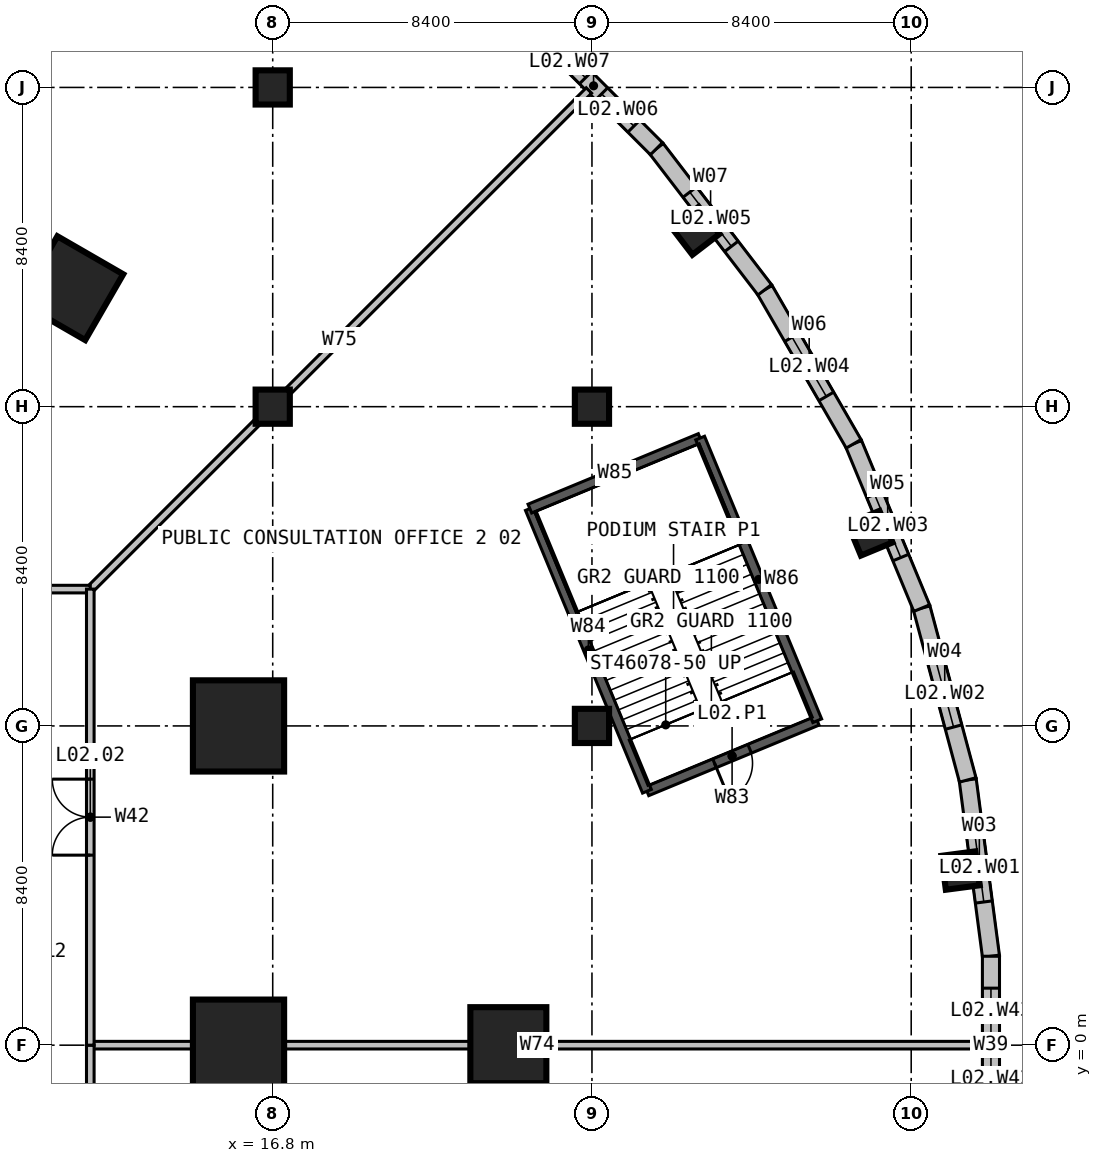
"""IFC4 building model, lengths in metres.
Left out: names, types, materials, properties, quantities, classifications, styles, units other than length and angle.
Written with IfcOpenShell. Run it as: python <this file> out.ifc"""

import sys

from ifc_helpers import new_model, si_unit, direction, frame, frame_2d, origin, origin_2d, place, context, subcontext, project, spatial, rectangle, hollow_rectangle, extrude, element, fill, save


model = new_model("IFC4")
c1 = context("Model", 3, precision=1e-05, world=origin(), true_north=direction((0.0, 1.0)))
c2 = subcontext(c1, "Body", "Model", "MODEL_VIEW")
j1 = project(units=[si_unit("LENGTHUNIT", "METRE"), si_unit("PLANEANGLEUNIT", "RADIAN")], contexts=[c1])
p1 = place(None, origin())
s1 = spatial("IfcSite", under=j1, at=p1, CompositionType="ELEMENT")
p2 = place(p1, origin())
s2 = spatial("IfcBuilding", under=s1, at=p2, CompositionType="ELEMENT")
p3 = place(p2, frame((0.0, 0.0, 11.0)))
s3 = spatial("IfcBuildingStorey", under=s2, at=p3, CompositionType="ELEMENT", Elevation=11.0)
for number, where, z_axis, x_axis in (
    (1, (15.9, 0.0, 0.0), (0.0, 0.0, 1.0), (1.0, 0.0, 0.0)),
    (2, (15.9, 8.4, 0.0), (0.0, 0.0, 1.0), (1.0, 0.0, 0.0)),
):
    element("IfcColumn", number, at=place(p3, frame(where, z_axis=z_axis, x_axis=x_axis)), inside=s3, PredefinedType="COLUMN", context=c2, shape_type="SweptSolid", body=[
        extrude(rectangle(XDim=2.4, YDim=2.4, at=origin_2d()), origin(), (0.0, 0.0, 1.0), 5.0),
    ])
for number, where, z_axis, x_axis in (
    (3, (16.8, 16.8, 0.0), (0.0, 0.0, 1.0), (1.0, 0.0, 0.0)),
    (4, (16.8, 25.2, 0.0), (0.0, 0.0, 1.0), (1.0, 0.0, 0.0)),
    (5, (25.2, 8.4, 0.0), (0.0, 0.0, 1.0), (1.0, 0.0, 0.0)),
    (6, (25.2, 16.8, 0.0), (0.0, 0.0, 1.0), (1.0, 0.0, 0.0)),
    (7, (34.899, 4.594, 0.0), (0.0, 0.0, 1.0), (0.991, 0.131, 0.0)),
    (8, (32.521, 13.47, 0.0), (0.0, 0.0, 1.0), (0.924, 0.383, 0.0)),
    (9, (27.926, 21.428, 0.0), (0.0, 0.0, 1.0), (0.793, 0.609, 0.0)),
):
    element("IfcColumn", number, at=place(p3, frame(where, z_axis=z_axis, x_axis=x_axis)), inside=s3, PredefinedType="COLUMN", context=c2, shape_type="SweptSolid", body=[
        extrude(rectangle(XDim=0.9, YDim=0.9, at=origin_2d()), origin(), (0.0, 0.0, 1.0), 5.0),
    ])
for number, where, z_axis, x_axis in (
    (10, (23.0, 0.0, 0.0), (0.0, 0.0, 1.0), (1.0, 0.0, 0.0)),
    (11, (11.5, 19.919, 0.0), (0.0, 0.0, 1.0), (0.5, 0.866, 0.0)),
):
    element("IfcColumn", number, at=place(p3, frame(where, z_axis=z_axis, x_axis=x_axis)), inside=s3, PredefinedType="COLUMN", context=c2, shape_type="SweptSolid", body=[
        extrude(hollow_rectangle(XDim=2.0, YDim=2.0, WallThickness=0.24, at=origin_2d()), origin(), (0.0, 0.0, 1.0), 5.0),
    ])
p4 = place(p3, frame((35.698, 2.34, 0.0), z_axis=(0.0, 0.0, 1.0), x_axis=(-0.130536838198, 0.991443459746, 0.0)))
e12 = element("IfcWall", 12, at=p4, inside=s3, PredefinedType="SOLIDWALL", context=c2, shape_type="SweptSolid", body=[
    extrude(rectangle(XDim=4.679, YDim=0.45, at=frame_2d((2.34, 0.0))), origin(), (0.0, 0.0, 1.0), 4.7),
])
p5 = place(p4, frame((1.44, 0.0, 0.9)))
e13 = element("IfcOpeningElement", 13, at=p5, cuts=e12, PredefinedType="OPENING", context=c2, shape_type="SweptSolid", body=[
    extrude(rectangle(XDim=1.8, YDim=2.4, at=frame_2d((0.9, 1.2))), frame((0.0, 0.235, 0.0), z_axis=(0.0, -1.0, 0.0), x_axis=(1.0, 0.0, 0.0)), (0.0, 0.0, 1.0), 0.47),
])
p6 = place(p3, frame((35.088, 6.979, 0.0), z_axis=(0.0, 0.0, 1.0), x_axis=(-0.258815185258, 0.965926860523, 0.0)))
e14 = element("IfcWall", 14, at=p6, inside=s3, PredefinedType="SOLIDWALL", context=c2, shape_type="SweptSolid", body=[
    extrude(rectangle(XDim=4.68, YDim=0.45, at=frame_2d((2.34, 0.0))), origin(), (0.0, 0.0, 1.0), 4.7),
])
p7 = place(p6, frame((1.44, 0.0, 0.9)))
e15 = element("IfcOpeningElement", 15, at=p7, cuts=e14, PredefinedType="OPENING", context=c2, shape_type="SweptSolid", body=[
    extrude(rectangle(XDim=1.8, YDim=2.4, at=frame_2d((0.9, 1.2))), frame((0.0, 0.235, 0.0), z_axis=(0.0, -1.0, 0.0), x_axis=(1.0, 0.0, 0.0)), (0.0, 0.0, 1.0), 0.47),
])
p8 = place(p3, frame((33.876, 11.5, 0.0), z_axis=(0.0, 0.0, 1.0), x_axis=(-0.382669718086, 0.923885213032, 0.0)))
e16 = element("IfcWall", 16, at=p8, inside=s3, PredefinedType="SOLIDWALL", context=c2, shape_type="SweptSolid", body=[
    extrude(rectangle(XDim=4.68, YDim=0.45, at=frame_2d((2.34, 0.0))), origin(), (0.0, 0.0, 1.0), 4.7),
])
p9 = place(p8, frame((1.44, 0.0, 0.9)))
e17 = element("IfcOpeningElement", 17, at=p9, cuts=e16, PredefinedType="OPENING", context=c2, shape_type="SweptSolid", body=[
    extrude(rectangle(XDim=1.8, YDim=2.4, at=frame_2d((0.9, 1.2))), frame((0.0, 0.235, 0.0), z_axis=(0.0, -1.0, 0.0), x_axis=(1.0, 0.0, 0.0)), (0.0, 0.0, 1.0), 0.47),
])
p10 = place(p3, frame((32.086, 15.823, 0.0), z_axis=(0.0, 0.0, 1.0), x_axis=(-0.500022025083, 0.866012687223, 0.0)))
e18 = element("IfcWall", 18, at=p10, inside=s3, PredefinedType="SOLIDWALL", context=c2, shape_type="SweptSolid", body=[
    extrude(rectangle(XDim=4.679, YDim=0.45, at=frame_2d((2.34, 0.0))), origin(), (0.0, 0.0, 1.0), 4.7),
])
p11 = place(p10, frame((1.44, 0.0, 0.9)))
e19 = element("IfcOpeningElement", 19, at=p11, cuts=e18, PredefinedType="OPENING", context=c2, shape_type="SweptSolid", body=[
    extrude(rectangle(XDim=1.8, YDim=2.4, at=frame_2d((0.9, 1.2))), frame((0.0, 0.235, 0.0), z_axis=(0.0, -1.0, 0.0), x_axis=(1.0, 0.0, 0.0)), (0.0, 0.0, 1.0), 0.47),
])
p12 = place(p3, frame((29.746, 19.875, 0.0), z_axis=(0.0, 0.0, 1.0), x_axis=(-0.608769916927, 0.79334682721, 0.0)))
e20 = element("IfcWall", 20, at=p12, inside=s3, PredefinedType="SOLIDWALL", context=c2, shape_type="SweptSolid", body=[
    extrude(rectangle(XDim=4.68, YDim=0.45, at=frame_2d((2.34, 0.0))), origin(), (0.0, 0.0, 1.0), 4.7),
])
p13 = place(p12, frame((1.44, 0.0, 0.9)))
e21 = element("IfcOpeningElement", 21, at=p13, cuts=e20, PredefinedType="OPENING", context=c2, shape_type="SweptSolid", body=[
    extrude(rectangle(XDim=1.8, YDim=2.4, at=frame_2d((0.9, 1.2))), frame((0.0, 0.235, 0.0), z_axis=(0.0, -1.0, 0.0), x_axis=(1.0, 0.0, 0.0)), (0.0, 0.0, 1.0), 0.47),
])
p14 = place(p3, frame((26.897, 23.588, 0.0), z_axis=(0.0, 0.0, 1.0), x_axis=(-0.707106781187, 0.707106781187, 0.0)))
e22 = element("IfcWall", 22, at=p14, inside=s3, PredefinedType="SOLIDWALL", context=c2, shape_type="SweptSolid", body=[
    extrude(rectangle(XDim=4.679, YDim=0.45, at=frame_2d((2.34, 0.0))), origin(), (0.0, 0.0, 1.0), 4.7),
])
p15 = place(p14, frame((0.84, 0.0, 0.9)))
e23 = element("IfcOpeningElement", 23, at=p15, cuts=e22, PredefinedType="OPENING", context=c2, shape_type="SweptSolid", body=[
    extrude(rectangle(XDim=1.2, YDim=2.4, at=frame_2d((0.6, 1.2))), frame((0.0, 0.235, 0.0), z_axis=(0.0, -1.0, 0.0), x_axis=(1.0, 0.0, 0.0)), (0.0, 0.0, 1.0), 0.47),
])
p16 = place(p14, frame((2.64, 0.0, 0.9)))
e24 = element("IfcOpeningElement", 24, at=p16, cuts=e22, PredefinedType="OPENING", context=c2, shape_type="SweptSolid", body=[
    extrude(rectangle(XDim=1.2, YDim=2.4, at=frame_2d((0.6, 1.2))), frame((0.0, 0.235, 0.0), z_axis=(0.0, -1.0, 0.0), x_axis=(1.0, 0.0, 0.0)), (0.0, 0.0, 1.0), 0.47),
])
p17 = place(p3, frame((35.698, -2.34, 0.0), z_axis=(0.0, 0.0, 1.0), x_axis=(0.0, 1.0, 0.0)))
e25 = element("IfcWall", 25, at=p17, inside=s3, PredefinedType="SOLIDWALL", context=c2, shape_type="SweptSolid", body=[
    extrude(rectangle(XDim=4.68, YDim=0.45, at=frame_2d((2.34, 0.0))), origin(), (0.0, 0.0, 1.0), 4.7),
])
p18 = place(p17, frame((0.84, 0.0, 0.9)))
e26 = element("IfcOpeningElement", 26, at=p18, cuts=e25, PredefinedType="OPENING", context=c2, shape_type="SweptSolid", body=[
    extrude(rectangle(XDim=1.2, YDim=2.4, at=frame_2d((0.6, 1.2))), frame((0.0, 0.235, 0.0), z_axis=(0.0, -1.0, 0.0), x_axis=(1.0, 0.0, 0.0)), (0.0, 0.0, 1.0), 0.47),
])
p19 = place(p17, frame((2.64, 0.0, 0.9)))
e27 = element("IfcOpeningElement", 27, at=p19, cuts=e25, PredefinedType="OPENING", context=c2, shape_type="SweptSolid", body=[
    extrude(rectangle(XDim=1.2, YDim=2.4, at=frame_2d((0.6, 1.2))), frame((0.0, 0.235, 0.0), z_axis=(0.0, -1.0, 0.0), x_axis=(1.0, 0.0, 0.0)), (0.0, 0.0, 1.0), 0.47),
])
p20 = place(p3, frame((31.127, 8.537, 0.0), z_axis=(0.0, 0.0, 1.0), x_axis=(-0.923880627248, -0.382680789426, 0.0)))
e28 = element("IfcWall", 28, at=p20, inside=s3, PredefinedType="SOLIDWALL", context=c2, shape_type="SweptSolid", body=[
    extrude(rectangle(XDim=4.85, YDim=0.25, at=frame_2d((2.425, 0.0))), origin(), (0.0, 0.0, 1.0), 5.0),
])
p21 = place(p20, frame((1.925, 0.0, 0.0)))
e29 = element("IfcOpeningElement", 29, at=p21, cuts=e28, PredefinedType="OPENING", context=c2, shape_type="SweptSolid", body=[
    extrude(rectangle(XDim=1.0, YDim=2.2, at=frame_2d((0.5, 1.1))), frame((0.0, 0.135, 0.0), z_axis=(0.0, -1.0, 0.0), x_axis=(1.0, 0.0, 0.0)), (0.0, 0.0, 1.0), 0.27),
])
p22 = place(p3, frame((26.647, 6.681, 0.0), z_axis=(0.0, 0.0, 1.0), x_axis=(-0.382689294869, 0.923877104161, 0.0)))
e30 = element("IfcWall", 30, at=p22, inside=s3, PredefinedType="SOLIDWALL", context=c2, shape_type="SweptSolid", body=[
    extrude(rectangle(XDim=8.05, YDim=0.25, at=frame_2d((4.025, 0.0))), origin(), (0.0, 0.0, 1.0), 5.0),
])
p23 = place(p3, frame((23.566, 14.118, 0.0), z_axis=(0.0, 0.0, 1.0), x_axis=(0.923862828997, 0.382723755727, 0.0)))
e31 = element("IfcWall", 31, at=p23, inside=s3, PredefinedType="SOLIDWALL", context=c2, shape_type="SweptSolid", body=[
    extrude(rectangle(XDim=4.85, YDim=0.25, at=frame_2d((2.425, 0.0))), origin(), (0.0, 0.0, 1.0), 5.0),
])
p24 = place(p3, frame((28.047, 15.974, 0.0), z_axis=(0.0, 0.0, 1.0), x_axis=(0.382678572144, -0.923881545666, 0.0)))
e32 = element("IfcWall", 32, at=p24, inside=s3, PredefinedType="SOLIDWALL", context=c2, shape_type="SweptSolid", body=[
    extrude(rectangle(XDim=8.05, YDim=0.25, at=frame_2d((4.025, 0.0))), origin(), (0.0, 0.0, 1.0), 5.0),
])
p25 = place(p3, frame((12.0, 0.0, 0.0), z_axis=(0.0, 0.0, 1.0), x_axis=(1.0, 0.0, 0.0)))
e33 = element("IfcWall", 33, at=p25, inside=s3, PredefinedType="PARTITIONING", context=c2, shape_type="SweptSolid", body=[
    extrude(rectangle(XDim=23.52, YDim=0.2, at=frame_2d((11.76, 0.0))), origin(), (0.0, 0.0, 1.0), 4.7),
])
p26 = place(p3, frame((12.0, 12.0, 0.0), z_axis=(0.0, 0.0, 1.0), x_axis=(0.707106781187, 0.707106781187, 0.0)))
e34 = element("IfcWall", 34, at=p26, inside=s3, PredefinedType="PARTITIONING", context=c2, shape_type="SweptSolid", body=[
    extrude(rectangle(XDim=18.555, YDim=0.2, at=frame_2d((9.277, 0.0))), origin(), (0.0, 0.0, 1.0), 4.7),
])
p27 = place(p3, frame((12.0, 12.0, 0.0), z_axis=(0.0, 0.0, 1.0), x_axis=(-1.0, 0.0, 0.0)))
e35 = element("IfcWall", 35, at=p27, inside=s3, PredefinedType="PARTITIONING", context=c2, shape_type="SweptSolid", body=[
    extrude(rectangle(XDim=24.0, YDim=0.2, at=frame_2d((12.0, 0.0))), origin(), (0.0, 0.0, 1.0), 4.7),
])
p28 = place(p27, frame((11.5, 0.0, 0.0)))
e36 = element("IfcOpeningElement", 36, at=p28, cuts=e35, PredefinedType="OPENING", context=c2, shape_type="SweptSolid", body=[
    extrude(rectangle(XDim=1.0, YDim=2.2, at=frame_2d((0.5, 1.1))), frame((0.0, 0.11, 0.0), z_axis=(0.0, -1.0, 0.0), x_axis=(1.0, 0.0, 0.0)), (0.0, 0.0, 1.0), 0.22),
])
p29 = place(p3, frame((12.0, -12.0, 0.0), z_axis=(0.0, 0.0, 1.0), x_axis=(0.0, 1.0, 0.0)))
e37 = element("IfcWall", 37, at=p29, inside=s3, PredefinedType="PARTITIONING", context=c2, shape_type="SweptSolid", body=[
    extrude(rectangle(XDim=12.0, YDim=0.2, at=frame_2d((6.0, 0.0))), origin(), (0.0, 0.0, 1.0), 4.7),
])
p30 = place(p3, frame((12.0, 0.0, 0.0), z_axis=(0.0, 0.0, 1.0), x_axis=(0.0, 1.0, 0.0)))
e38 = element("IfcWall", 38, at=p30, inside=s3, PredefinedType="PARTITIONING", context=c2, shape_type="SweptSolid", body=[
    extrude(rectangle(XDim=12.0, YDim=0.2, at=frame_2d((6.0, 0.0))), origin(), (0.0, 0.0, 1.0), 4.7),
])
p31 = place(p30, frame((5.0, 0.0, 0.0)))
e39 = element("IfcOpeningElement", 39, at=p31, cuts=e38, PredefinedType="OPENING", context=c2, shape_type="SweptSolid", body=[
    extrude(rectangle(XDim=2.0, YDim=2.4, at=frame_2d((1.0, 1.2))), frame((0.0, 0.11, 0.0), z_axis=(0.0, -1.0, 0.0), x_axis=(1.0, 0.0, 0.0)), (0.0, 0.0, 1.0), 0.22),
])
p32 = place(p5, origin())
e40 = element("IfcWindow", 40, at=p32, inside=s3, PartitioningType="SINGLE_PANEL", PredefinedType="WINDOW", context=c2, shape_type="SweptSolid", body=[
    extrude(rectangle(XDim=1.8, YDim=2.4, at=frame_2d((0.9, 1.2))), frame((0.0, 0.03, 0.0), z_axis=(0.0, -1.0, 0.0), x_axis=(1.0, 0.0, 0.0)), (0.0, 0.0, 1.0), 0.06),
])
fill(e13, e40)
p33 = place(p7, origin())
e41 = element("IfcWindow", 41, at=p33, inside=s3, PartitioningType="SINGLE_PANEL", PredefinedType="WINDOW", context=c2, shape_type="SweptSolid", body=[
    extrude(rectangle(XDim=1.8, YDim=2.4, at=frame_2d((0.9, 1.2))), frame((0.0, 0.03, 0.0), z_axis=(0.0, -1.0, 0.0), x_axis=(1.0, 0.0, 0.0)), (0.0, 0.0, 1.0), 0.06),
])
fill(e15, e41)
p34 = place(p9, origin())
e42 = element("IfcWindow", 42, at=p34, inside=s3, PartitioningType="SINGLE_PANEL", PredefinedType="WINDOW", context=c2, shape_type="SweptSolid", body=[
    extrude(rectangle(XDim=1.8, YDim=2.4, at=frame_2d((0.9, 1.2))), frame((0.0, 0.03, 0.0), z_axis=(0.0, -1.0, 0.0), x_axis=(1.0, 0.0, 0.0)), (0.0, 0.0, 1.0), 0.06),
])
fill(e17, e42)
p35 = place(p11, origin())
e43 = element("IfcWindow", 43, at=p35, inside=s3, PartitioningType="SINGLE_PANEL", PredefinedType="WINDOW", context=c2, shape_type="SweptSolid", body=[
    extrude(rectangle(XDim=1.8, YDim=2.4, at=frame_2d((0.9, 1.2))), frame((0.0, 0.03, 0.0), z_axis=(0.0, -1.0, 0.0), x_axis=(1.0, 0.0, 0.0)), (0.0, 0.0, 1.0), 0.06),
])
fill(e19, e43)
p36 = place(p13, origin())
e44 = element("IfcWindow", 44, at=p36, inside=s3, PartitioningType="SINGLE_PANEL", PredefinedType="WINDOW", context=c2, shape_type="SweptSolid", body=[
    extrude(rectangle(XDim=1.8, YDim=2.4, at=frame_2d((0.9, 1.2))), frame((0.0, 0.03, 0.0), z_axis=(0.0, -1.0, 0.0), x_axis=(1.0, 0.0, 0.0)), (0.0, 0.0, 1.0), 0.06),
])
fill(e21, e44)
p37 = place(p15, origin())
e45 = element("IfcWindow", 45, at=p37, inside=s3, PartitioningType="SINGLE_PANEL", PredefinedType="WINDOW", context=c2, shape_type="SweptSolid", body=[
    extrude(rectangle(XDim=1.2, YDim=2.4, at=frame_2d((0.6, 1.2))), frame((0.0, 0.03, 0.0), z_axis=(0.0, -1.0, 0.0), x_axis=(1.0, 0.0, 0.0)), (0.0, 0.0, 1.0), 0.06),
])
fill(e23, e45)
p38 = place(p16, origin())
e46 = element("IfcWindow", 46, at=p38, inside=s3, PartitioningType="SINGLE_PANEL", PredefinedType="WINDOW", context=c2, shape_type="SweptSolid", body=[
    extrude(rectangle(XDim=1.2, YDim=2.4, at=frame_2d((0.6, 1.2))), frame((0.0, 0.03, 0.0), z_axis=(0.0, -1.0, 0.0), x_axis=(1.0, 0.0, 0.0)), (0.0, 0.0, 1.0), 0.06),
])
fill(e24, e46)
p39 = place(p18, origin())
e47 = element("IfcWindow", 47, at=p39, inside=s3, PartitioningType="SINGLE_PANEL", PredefinedType="WINDOW", context=c2, shape_type="SweptSolid", body=[
    extrude(rectangle(XDim=1.2, YDim=2.4, at=frame_2d((0.6, 1.2))), frame((0.0, 0.03, 0.0), z_axis=(0.0, -1.0, 0.0), x_axis=(1.0, 0.0, 0.0)), (0.0, 0.0, 1.0), 0.06),
])
fill(e26, e47)
p40 = place(p19, origin())
e48 = element("IfcWindow", 48, at=p40, inside=s3, PartitioningType="SINGLE_PANEL", PredefinedType="WINDOW", context=c2, shape_type="SweptSolid", body=[
    extrude(rectangle(XDim=1.2, YDim=2.4, at=frame_2d((0.6, 1.2))), frame((0.0, 0.03, 0.0), z_axis=(0.0, -1.0, 0.0), x_axis=(1.0, 0.0, 0.0)), (0.0, 0.0, 1.0), 0.06),
])
fill(e27, e48)
p41 = place(p21, origin())
e49 = element("IfcDoor", 49, at=p41, inside=s3, OperationType="SINGLE_SWING_RIGHT", PredefinedType="DOOR", context=c2, shape_type="SweptSolid", body=[
    extrude(rectangle(XDim=1.0, YDim=2.2, at=frame_2d((0.5, 1.1))), frame((0.0, 0.025, 0.0), z_axis=(0.0, -1.0, 0.0), x_axis=(1.0, 0.0, 0.0)), (0.0, 0.0, 1.0), 0.05),
])
fill(e29, e49)
p42 = place(p31, origin())
e50 = element("IfcDoor", 50, at=p42, inside=s3, OperationType="DOUBLE_DOOR_SINGLE_SWING", PredefinedType="DOOR", context=c2, shape_type="SweptSolid", body=[
    extrude(rectangle(XDim=2.0, YDim=2.4, at=frame_2d((1.0, 1.2))), frame((0.0, 0.025, 0.0), z_axis=(0.0, -1.0, 0.0), x_axis=(1.0, 0.0, 0.0)), (0.0, 0.0, 1.0), 0.05),
])
fill(e39, e50)
save(model, sys.argv[1])
